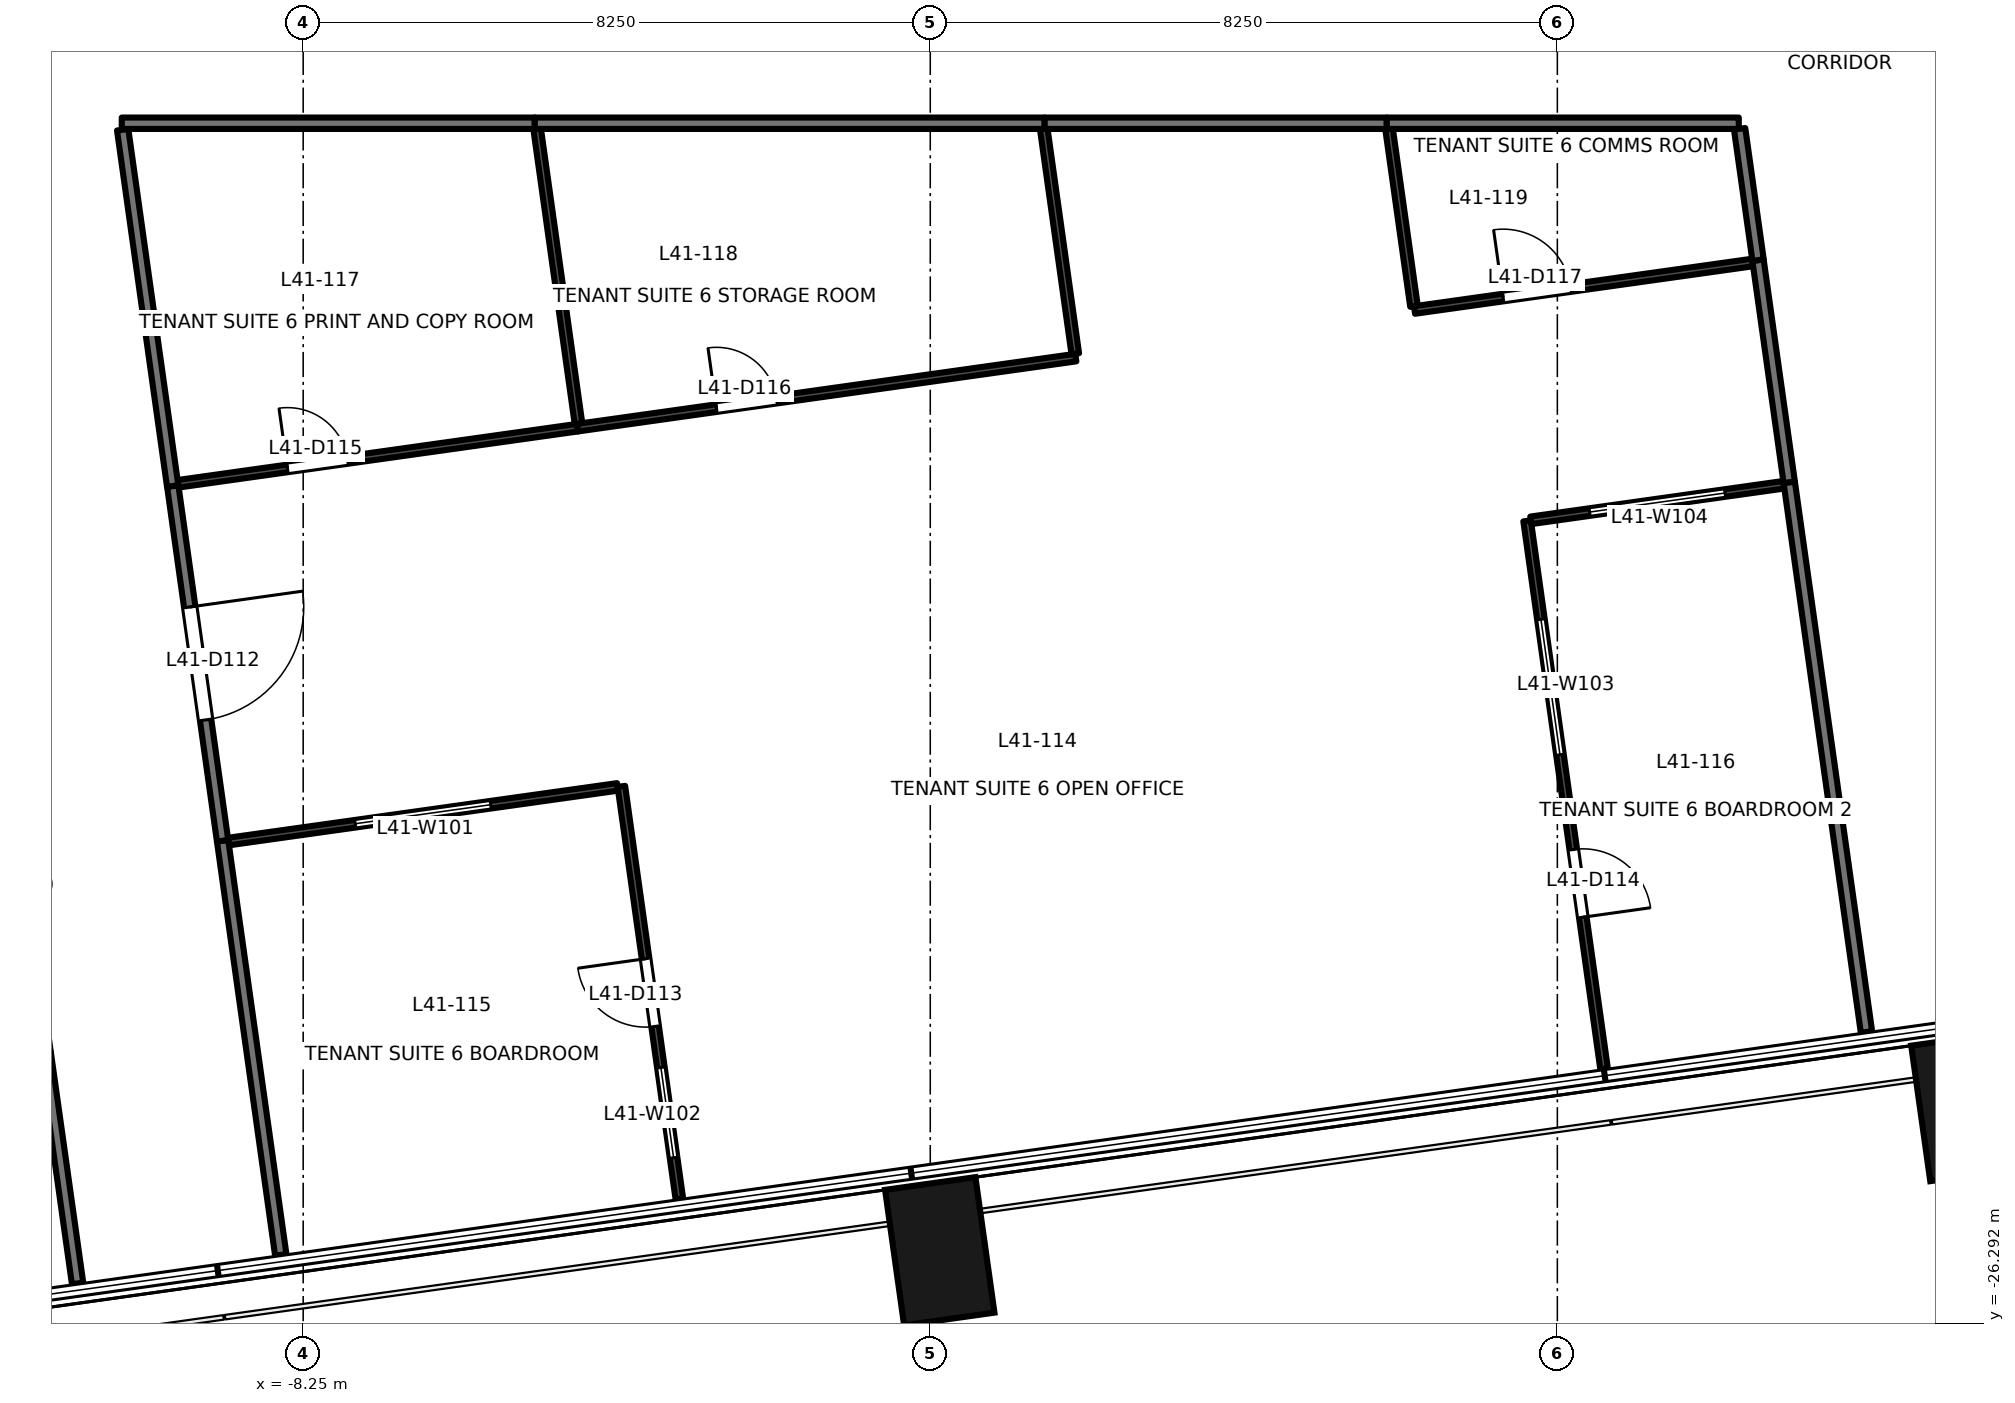
"""IFC4 building model, lengths in metres.
Left out: names, types, materials, properties, quantities, classifications, styles, units other than length and angle.
Written with IfcOpenShell. Run it as: python <this file> out.ifc"""

import sys

from ifc_helpers import new_model, si_unit, direction, frame, frame_2d, origin, origin_2d, place, context, subcontext, project, spatial, rectangle, extrude, element, fill, save


model = new_model("IFC4")
c1 = context("Model", 3, precision=1e-05, world=origin(), true_north=direction((0.0, 1.0)))
c2 = subcontext(c1, "Body", "Model", "MODEL_VIEW")
j1 = project(units=[si_unit("LENGTHUNIT", "METRE"), si_unit("PLANEANGLEUNIT", "RADIAN")], contexts=[c1])
p1 = place(None, origin())
s1 = spatial("IfcSite", under=j1, at=p1, CompositionType="ELEMENT")
p2 = place(p1, origin())
s2 = spatial("IfcBuilding", under=s1, at=p2, CompositionType="ELEMENT")
p3 = place(p2, frame((0.0, 0.0, 180.2)))
s3 = spatial("IfcBuildingStorey", under=s2, at=p3, CompositionType="ELEMENT", Elevation=180.2)
for number, where, z_axis, x_axis in (
    (1, (0.125, -25.34, -0.2), (0.0, 0.0, 1.0), (0.99, 0.139, 0.0)),
    (2, (13.625, -23.443, -0.2), (0.0, 0.0, 1.0), (0.99, 0.139, 0.0)),
):
    element("IfcColumn", number, at=place(p3, frame(where, z_axis=z_axis, x_axis=x_axis)), inside=s3, PredefinedType="COLUMN", context=c2, shape_type="SweptSolid", body=[
        extrude(rectangle(XDim=1.2, YDim=1.8, at=origin_2d()), origin(), (0.0, 0.0, 1.0), 3.9),
    ])
p4 = place(p3, frame((-11.218, -25.763, 0.0), z_axis=(0.0, 0.0, 1.0), x_axis=(-0.139187613425, 0.990266029039, 0.0)))
e3 = element("IfcWall", 3, at=p4, inside=s3, PredefinedType="PARTITIONING", context=c2, shape_type="SweptSolid", body=[
    extrude(rectangle(XDim=3.061, YDim=0.15, at=frame_2d((1.53, 0.0))), origin(), (0.0, 0.0, 1.0), 3.7),
])
p5 = place(p3, frame((-9.966, -15.273, 0.0), z_axis=(0.0, 0.0, 1.0), x_axis=(0.139137407344, -0.990273084496, 0.0)))
e4 = element("IfcWall", 4, at=p5, inside=s3, PredefinedType="PARTITIONING", context=c2, shape_type="SweptSolid", body=[
    extrude(rectangle(XDim=4.715, YDim=0.15, at=frame_2d((2.357, 0.0))), origin(), (0.0, 0.0, 1.0), 3.7),
])
p6 = place(p5, frame((1.607, 0.0, 0.0)))
e5 = element("IfcOpeningElement", 5, at=p6, cuts=e4, PredefinedType="OPENING", context=c2, shape_type="SweptSolid", body=[
    extrude(rectangle(XDim=1.5, YDim=2.1, at=frame_2d((0.75, 1.05))), frame((0.0, 0.085, 0.0), z_axis=(0.0, -1.0, 0.0), x_axis=(1.0, 0.0, 0.0)), (0.0, 0.0, 1.0), 0.171),
])
p7 = place(p3, frame((6.006, -10.5, 0.0), z_axis=(0.0, 0.0, 1.0), x_axis=(-1.0, 0.0, 0.0)))
e6 = element("IfcWall", 6, at=p7, inside=s3, PredefinedType="PARTITIONING", context=c2, shape_type="SweptSolid", body=[
    extrude(rectangle(XDim=4.504, YDim=0.15, at=frame_2d((2.252, 0.0))), origin(), (0.0, 0.0, 1.0), 2.9),
])
p8 = place(p3, frame((11.301, -15.226, 0.0), z_axis=(0.0, 0.0, 1.0), x_axis=(-0.139233295347, 0.990259607107, 0.0)))
e7 = element("IfcWall", 7, at=p8, inside=s3, PredefinedType="PARTITIONING", context=c2, shape_type="SweptSolid", body=[
    extrude(rectangle(XDim=2.953, YDim=0.15, at=frame_2d((1.477, 0.0))), origin(), (0.0, 0.0, 1.0), 3.7),
])
p9 = place(p3, frame((-9.31, -19.941, 0.0), z_axis=(0.0, 0.0, 1.0), x_axis=(0.139103174181, -0.990277893792, 0.0)))
e8 = element("IfcWall", 8, at=p9, inside=s3, PredefinedType="PARTITIONING", context=c2, shape_type="SweptSolid", body=[
    extrude(rectangle(XDim=5.5, YDim=0.15, at=frame_2d((2.75, 0.0))), origin(), (0.0, 0.0, 1.0), 2.8),
])
p10 = place(p3, frame((12.317, -22.456, 0.0), z_axis=(0.0, 0.0, 1.0), x_axis=(-0.139141087095, 0.990272567469, 0.0)))
e9 = element("IfcWall", 9, at=p10, inside=s3, PredefinedType="PARTITIONING", context=c2, shape_type="SweptSolid", body=[
    extrude(rectangle(XDim=7.301, YDim=0.15, at=frame_2d((3.65, 0.0))), origin(), (0.0, 0.0, 1.0), 3.7),
])
p11 = place(p3, frame((-10.625, -10.585, 0.0), z_axis=(0.0, 0.0, 1.0), x_axis=(0.138987741071, -0.990294101685, 0.0)))
e10 = element("IfcWall", 10, at=p11, inside=s3, PredefinedType="PARTITIONING", context=c2, shape_type="SweptSolid", body=[
    extrude(rectangle(XDim=4.734, YDim=0.15, at=frame_2d((2.367, 0.0))), origin(), (0.0, 0.0, 1.0), 3.7),
])
p12 = place(p3, frame((-5.203, -10.5, 0.0), z_axis=(0.0, 0.0, 1.0), x_axis=(-1.0, 0.0, 0.0)))
e11 = element("IfcWall", 11, at=p12, inside=s3, PredefinedType="PARTITIONING", context=c2, shape_type="SweptSolid", body=[
    extrude(rectangle(XDim=5.434, YDim=0.15, at=frame_2d((2.717, 0.0))), origin(), (0.0, 0.0, 1.0), 2.8),
])
p13 = place(p3, frame((1.502, -10.5, 0.0), z_axis=(0.0, 0.0, 1.0), x_axis=(-1.0, 0.0, 0.0)))
e12 = element("IfcWall", 12, at=p13, inside=s3, PredefinedType="PARTITIONING", context=c2, shape_type="SweptSolid", body=[
    extrude(rectangle(XDim=6.705, YDim=0.15, at=frame_2d((3.353, 0.0))), origin(), (0.0, 0.0, 1.0), 2.9),
])
p14 = place(p3, frame((10.637, -10.5, 0.0), z_axis=(0.0, 0.0, 1.0), x_axis=(-1.0, 0.0, 0.0)))
e13 = element("IfcWall", 13, at=p14, inside=s3, PredefinedType="PARTITIONING", context=c2, shape_type="SweptSolid", body=[
    extrude(rectangle(XDim=4.631, YDim=0.15, at=frame_2d((2.315, 0.0))), origin(), (0.0, 0.0, 1.0), 3.0),
])
p15 = place(p3, frame((10.891, -12.301, 0.0), z_axis=(0.0, 0.0, 1.0), x_axis=(-0.139344862723, 0.990243914009, 0.0)))
e14 = element("IfcWall", 14, at=p15, inside=s3, PredefinedType="PARTITIONING", context=c2, shape_type="SweptSolid", body=[
    extrude(rectangle(XDim=1.745, YDim=0.15, at=frame_2d((0.873, 0.0))), origin(), (0.0, 0.0, 1.0), 3.7),
])
p16 = place(p3, frame((-4.114, -19.231, 0.0), z_axis=(0.0, 0.0, 1.0), x_axis=(-0.990279259335, -0.139093452508, 0.0)))
e15 = element("IfcWall", 15, at=p16, inside=s3, PredefinedType="PARTITIONING", context=c2, shape_type="SweptSolid", body=[
    extrude(rectangle(XDim=5.169, YDim=0.1, at=frame_2d((2.584, 0.0))), origin(), (0.0, 0.0, 1.0), 2.8),
])
p17 = place(p16, frame((1.685, 0.0, 0.9)))
e16 = element("IfcOpeningElement", 16, at=p17, cuts=e15, PredefinedType="OPENING", context=c2, shape_type="SweptSolid", body=[
    extrude(rectangle(XDim=1.8, YDim=1.2, at=frame_2d((0.9, 0.6))), frame((0.0, 0.061, 0.0), z_axis=(0.0, -1.0, 0.0), x_axis=(1.0, 0.0, 0.0)), (0.0, 0.0, 1.0), 0.121),
])
p18 = place(p3, frame((-3.301, -24.65, 0.0), z_axis=(0.0, 0.0, 1.0), x_axis=(-0.139243907894, 0.990258114894, 0.0)))
e17 = element("IfcWall", 17, at=p18, inside=s3, PredefinedType="PARTITIONING", context=c2, shape_type="SweptSolid", body=[
    extrude(rectangle(XDim=5.479, YDim=0.1, at=frame_2d((2.74, 0.0))), origin(), (0.0, 0.0, 1.0), 3.7),
])
p19 = place(p18, frame((2.29, 0.0, 0.0)))
e18 = element("IfcOpeningElement", 18, at=p19, cuts=e17, PredefinedType="OPENING", context=c2, shape_type="SweptSolid", body=[
    extrude(rectangle(XDim=0.9, YDim=2.1, at=frame_2d((0.45, 1.05))), frame((0.0, 0.061, 0.0), z_axis=(0.0, -1.0, 0.0), x_axis=(1.0, 0.0, 0.0)), (0.0, 0.0, 1.0), 0.121),
])
p20 = place(p18, frame((0.545, 0.0, 0.9)))
e19 = element("IfcOpeningElement", 19, at=p20, cuts=e17, PredefinedType="OPENING", context=c2, shape_type="SweptSolid", body=[
    extrude(rectangle(XDim=1.2, YDim=1.2, at=frame_2d((0.6, 0.6))), frame((0.0, 0.061, 0.0), z_axis=(0.0, -1.0, 0.0), x_axis=(1.0, 0.0, 0.0)), (0.0, 0.0, 1.0), 0.121),
])
p21 = place(p3, frame((7.852, -15.731, 0.0), z_axis=(0.0, 0.0, 1.0), x_axis=(0.139143839005, -0.9902721808, 0.0)))
e20 = element("IfcWall", 20, at=p21, inside=s3, PredefinedType="PARTITIONING", context=c2, shape_type="SweptSolid", body=[
    extrude(rectangle(XDim=7.28, YDim=0.1, at=frame_2d((3.64, 0.0))), origin(), (0.0, 0.0, 1.0), 3.0),
])
p22 = place(p21, frame((4.366, 0.0, 0.0)))
e21 = element("IfcOpeningElement", 21, at=p22, cuts=e20, PredefinedType="OPENING", context=c2, shape_type="SweptSolid", body=[
    extrude(rectangle(XDim=0.9, YDim=2.1, at=frame_2d((0.45, 1.05))), frame((0.0, 0.061, 0.0), z_axis=(0.0, -1.0, 0.0), x_axis=(1.0, 0.0, 0.0)), (0.0, 0.0, 1.0), 0.121),
])
p23 = place(p21, frame((1.308, 0.0, 0.9)))
e22 = element("IfcOpeningElement", 22, at=p23, cuts=e20, PredefinedType="OPENING", context=c2, shape_type="SweptSolid", body=[
    extrude(rectangle(XDim=1.8, YDim=1.2, at=frame_2d((0.9, 0.6))), frame((0.0, 0.061, 0.0), z_axis=(0.0, -1.0, 0.0), x_axis=(1.0, 0.0, 0.0)), (0.0, 0.0, 1.0), 0.121),
])
p24 = place(p3, frame((11.229, -15.256, 0.0), z_axis=(0.0, 0.0, 1.0), x_axis=(-0.990256578838, -0.139254831399, 0.0)))
e23 = element("IfcWall", 23, at=p24, inside=s3, PredefinedType="PARTITIONING", context=c2, shape_type="SweptSolid", body=[
    extrude(rectangle(XDim=3.361, YDim=0.1, at=frame_2d((1.68, 0.0))), origin(), (0.0, 0.0, 1.0), 3.0),
])
p25 = place(p24, frame((0.78, 0.0, 0.9)))
e24 = element("IfcOpeningElement", 24, at=p25, cuts=e23, PredefinedType="OPENING", context=c2, shape_type="SweptSolid", body=[
    extrude(rectangle(XDim=1.8, YDim=1.2, at=frame_2d((0.9, 0.6))), frame((0.0, 0.061, 0.0), z_axis=(0.0, -1.0, 0.0), x_axis=(1.0, 0.0, 0.0)), (0.0, 0.0, 1.0), 0.121),
])
p26 = place(p3, frame((-9.895, -15.243, 0.0), z_axis=(0.0, 0.0, 1.0), x_axis=(0.99027719117, 0.139108176064, 0.0)))
e25 = element("IfcWall", 25, at=p26, inside=s3, PredefinedType="PARTITIONING", context=c2, shape_type="SweptSolid", body=[
    extrude(rectangle(XDim=5.305, YDim=0.1, at=frame_2d((2.653, 0.0))), origin(), (0.0, 0.0, 1.0), 2.8),
])
p27 = place(p26, frame((1.452, 0.0, 0.0)))
e26 = element("IfcOpeningElement", 26, at=p27, cuts=e25, PredefinedType="OPENING", context=c2, shape_type="SweptSolid", body=[
    extrude(rectangle(XDim=0.8, YDim=2.1, at=frame_2d((0.4, 1.05))), frame((0.0, 0.061, 0.0), z_axis=(0.0, -1.0, 0.0), x_axis=(1.0, 0.0, 0.0)), (0.0, 0.0, 1.0), 0.121),
])
p28 = place(p3, frame((-4.641, -14.505, 0.0), z_axis=(0.0, 0.0, 1.0), x_axis=(0.990258326755, 0.1392424012, 0.0)))
e27 = element("IfcWall", 27, at=p28, inside=s3, PredefinedType="PARTITIONING", context=c2, shape_type="SweptSolid", body=[
    extrude(rectangle(XDim=6.621, YDim=0.1, at=frame_2d((3.31, 0.0))), origin(), (0.0, 0.0, 1.0), 2.9),
])
p29 = place(p28, frame((1.846, 0.0, 0.0)))
e28 = element("IfcOpeningElement", 28, at=p29, cuts=e27, PredefinedType="OPENING", context=c2, shape_type="SweptSolid", body=[
    extrude(rectangle(XDim=0.8, YDim=2.1, at=frame_2d((0.4, 1.05))), frame((0.0, 0.061, 0.0), z_axis=(0.0, -1.0, 0.0), x_axis=(1.0, 0.0, 0.0)), (0.0, 0.0, 1.0), 0.121),
])
p30 = place(p3, frame((1.908, -13.533, 0.0), z_axis=(0.0, 0.0, 1.0), x_axis=(-0.138954956276, 0.990298702476, 0.0)))
e29 = element("IfcWall", 29, at=p30, inside=s3, PredefinedType="PARTITIONING", context=c2, shape_type="SweptSolid", body=[
    extrude(rectangle(XDim=2.994, YDim=0.1, at=frame_2d((1.497, 0.0))), origin(), (0.0, 0.0, 1.0), 3.7),
])
p31 = place(p3, frame((6.035, -10.568, 0.0), z_axis=(0.0, 0.0, 1.0), x_axis=(0.139280161334, -0.990253016486, 0.0)))
e30 = element("IfcWall", 30, at=p31, inside=s3, PredefinedType="PARTITIONING", context=c2, shape_type="SweptSolid", body=[
    extrude(rectangle(XDim=2.363, YDim=0.1, at=frame_2d((1.181, 0.0))), origin(), (0.0, 0.0, 1.0), 3.7),
])
p32 = place(p3, frame((6.371, -12.957, 0.0), z_axis=(0.0, 0.0, 1.0), x_axis=(0.990271914732, 0.139145732571, 0.0)))
e31 = element("IfcWall", 31, at=p32, inside=s3, PredefinedType="PARTITIONING", context=c2, shape_type="SweptSolid", body=[
    extrude(rectangle(XDim=4.492, YDim=0.1, at=frame_2d((2.246, 0.0))), origin(), (0.0, 0.0, 1.0), 3.0),
])
p33 = place(p32, frame((1.177, 0.0, 0.0)))
e32 = element("IfcOpeningElement", 32, at=p33, cuts=e31, PredefinedType="OPENING", context=c2, shape_type="SweptSolid", body=[
    extrude(rectangle(XDim=0.9, YDim=2.1, at=frame_2d((0.45, 1.05))), frame((0.0, 0.061, 0.0), z_axis=(0.0, -1.0, 0.0), x_axis=(1.0, 0.0, 0.0)), (0.0, 0.0, 1.0), 0.121),
])
p34 = place(p3, frame((-5.173, -10.568, 0.0), z_axis=(0.0, 0.0, 1.0), x_axis=(0.139006835826, -0.990291421549, 0.0)))
e33 = element("IfcWall", 33, at=p34, inside=s3, PredefinedType="PARTITIONING", context=c2, shape_type="SweptSolid", body=[
    extrude(rectangle(XDim=3.922, YDim=0.1, at=frame_2d((1.961, 0.0))), origin(), (0.0, 0.0, 1.0), 2.9),
])
p35 = place(p6, origin())
e34 = element("IfcDoor", 34, at=p35, inside=s3, OperationType="DOUBLE_DOOR_SINGLE_SWING", PredefinedType="DOOR", context=c2, shape_type="SweptSolid", body=[
    extrude(rectangle(XDim=1.5, YDim=2.1, at=frame_2d((0.75, 1.05))), frame((0.0, 0.025, 0.0), z_axis=(0.0, -1.0, 0.0), x_axis=(1.0, 0.0, 0.0)), (0.0, 0.0, 1.0), 0.05),
])
fill(e5, e34)
p36 = place(p19, origin())
e35 = element("IfcDoor", 35, at=p36, inside=s3, OperationType="SINGLE_SWING_RIGHT", PredefinedType="DOOR", context=c2, shape_type="SweptSolid", body=[
    extrude(rectangle(XDim=0.9, YDim=2.1, at=frame_2d((0.45, 1.05))), frame((0.0, 0.025, 0.0), z_axis=(0.0, -1.0, 0.0), x_axis=(1.0, 0.0, 0.0)), (0.0, 0.0, 1.0), 0.05),
])
fill(e18, e35)
p37 = place(p22, origin())
e36 = element("IfcDoor", 36, at=p37, inside=s3, OperationType="SINGLE_SWING_RIGHT", PredefinedType="DOOR", context=c2, shape_type="SweptSolid", body=[
    extrude(rectangle(XDim=0.9, YDim=2.1, at=frame_2d((0.45, 1.05))), frame((0.0, 0.025, 0.0), z_axis=(0.0, -1.0, 0.0), x_axis=(1.0, 0.0, 0.0)), (0.0, 0.0, 1.0), 0.05),
])
fill(e21, e36)
p38 = place(p27, origin())
e37 = element("IfcDoor", 37, at=p38, inside=s3, OperationType="SINGLE_SWING_LEFT", PredefinedType="DOOR", context=c2, shape_type="SweptSolid", body=[
    extrude(rectangle(XDim=0.8, YDim=2.1, at=frame_2d((0.4, 1.05))), frame((0.0, 0.025, 0.0), z_axis=(0.0, -1.0, 0.0), x_axis=(1.0, 0.0, 0.0)), (0.0, 0.0, 1.0), 0.05),
])
fill(e26, e37)
p39 = place(p29, origin())
e38 = element("IfcDoor", 38, at=p39, inside=s3, OperationType="SINGLE_SWING_LEFT", PredefinedType="DOOR", context=c2, shape_type="SweptSolid", body=[
    extrude(rectangle(XDim=0.8, YDim=2.1, at=frame_2d((0.4, 1.05))), frame((0.0, 0.025, 0.0), z_axis=(0.0, -1.0, 0.0), x_axis=(1.0, 0.0, 0.0)), (0.0, 0.0, 1.0), 0.05),
])
fill(e28, e38)
p40 = place(p33, origin())
e39 = element("IfcDoor", 39, at=p40, inside=s3, OperationType="SINGLE_SWING_LEFT", PredefinedType="DOOR", context=c2, shape_type="SweptSolid", body=[
    extrude(rectangle(XDim=0.9, YDim=2.1, at=frame_2d((0.45, 1.05))), frame((0.0, 0.025, 0.0), z_axis=(0.0, -1.0, 0.0), x_axis=(1.0, 0.0, 0.0)), (0.0, 0.0, 1.0), 0.05),
])
fill(e32, e39)
p41 = place(p17, origin())
e40 = element("IfcWindow", 40, at=p41, inside=s3, PartitioningType="SINGLE_PANEL", PredefinedType="WINDOW", context=c2, shape_type="SweptSolid", body=[
    extrude(rectangle(XDim=1.8, YDim=1.2, at=frame_2d((0.9, 0.6))), frame((0.0, 0.03, 0.0), z_axis=(0.0, -1.0, 0.0), x_axis=(1.0, 0.0, 0.0)), (0.0, 0.0, 1.0), 0.06),
])
fill(e16, e40)
p42 = place(p20, origin())
e41 = element("IfcWindow", 41, at=p42, inside=s3, PartitioningType="SINGLE_PANEL", PredefinedType="WINDOW", context=c2, shape_type="SweptSolid", body=[
    extrude(rectangle(XDim=1.2, YDim=1.2, at=frame_2d((0.6, 0.6))), frame((0.0, 0.03, 0.0), z_axis=(0.0, -1.0, 0.0), x_axis=(1.0, 0.0, 0.0)), (0.0, 0.0, 1.0), 0.06),
])
fill(e19, e41)
p43 = place(p23, origin())
e42 = element("IfcWindow", 42, at=p43, inside=s3, PartitioningType="SINGLE_PANEL", PredefinedType="WINDOW", context=c2, shape_type="SweptSolid", body=[
    extrude(rectangle(XDim=1.8, YDim=1.2, at=frame_2d((0.9, 0.6))), frame((0.0, 0.03, 0.0), z_axis=(0.0, -1.0, 0.0), x_axis=(1.0, 0.0, 0.0)), (0.0, 0.0, 1.0), 0.06),
])
fill(e22, e42)
p44 = place(p25, origin())
e43 = element("IfcWindow", 43, at=p44, inside=s3, PartitioningType="SINGLE_PANEL", PredefinedType="WINDOW", context=c2, shape_type="SweptSolid", body=[
    extrude(rectangle(XDim=1.8, YDim=1.2, at=frame_2d((0.9, 0.6))), frame((0.0, 0.03, 0.0), z_axis=(0.0, -1.0, 0.0), x_axis=(1.0, 0.0, 0.0)), (0.0, 0.0, 1.0), 0.06),
])
fill(e24, e43)
save(model, sys.argv[1])
